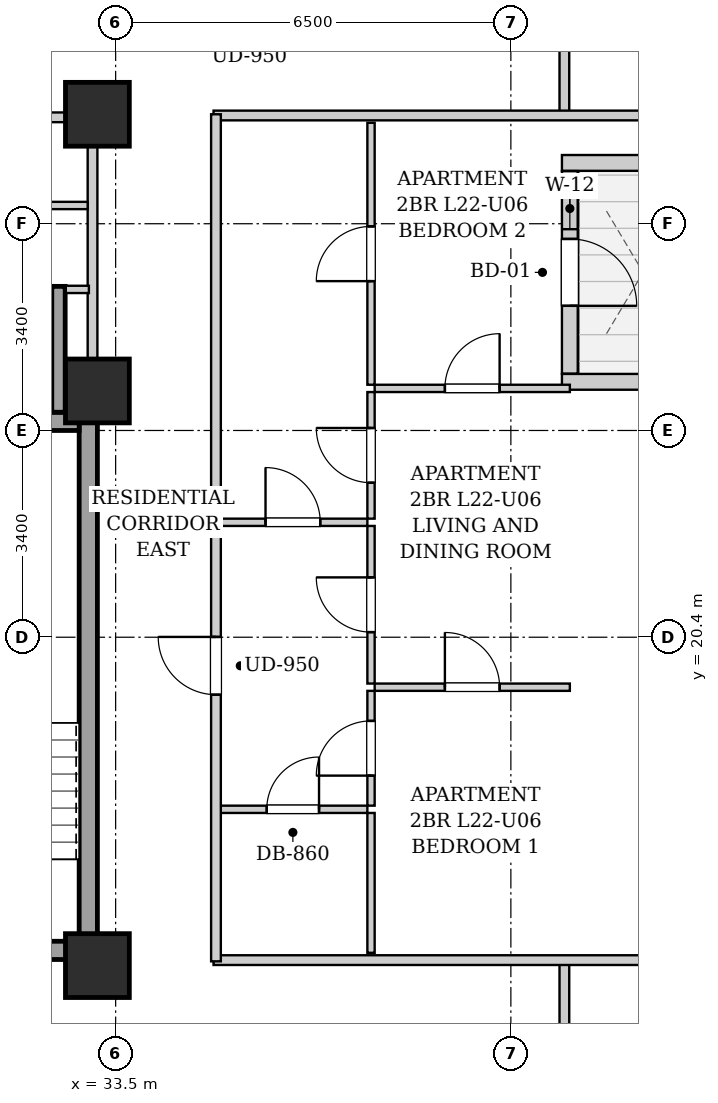
"""IFC4 building model, lengths in metres.
Left out: names, types, materials, properties, quantities, classifications, styles, units other than length and angle.
Written with IfcOpenShell. Run it as: python <this file> out.ifc"""

import sys

from ifc_helpers import new_model, si_unit, direction, frame, frame_2d, origin, origin_2d, place, context, subcontext, project, spatial, rectangle, extrude, element, fill, save


model = new_model("IFC4")
c1 = context("Model", 3, precision=1e-05, world=origin(), true_north=direction((0.0, 1.0)))
c2 = subcontext(c1, "Body", "Model", "MODEL_VIEW")
j1 = project(units=[si_unit("LENGTHUNIT", "METRE"), si_unit("PLANEANGLEUNIT", "RADIAN")], contexts=[c1])
p1 = place(None, origin())
s1 = spatial("IfcSite", under=j1, at=p1, CompositionType="ELEMENT")
p2 = place(p1, origin())
s2 = spatial("IfcBuilding", under=s1, at=p2, CompositionType="ELEMENT")
p3 = place(p2, frame((0.0, 0.0, 81.5)))
s3 = spatial("IfcBuildingStorey", under=s2, at=p3, CompositionType="ELEMENT", Elevation=81.5)
for number, where, z_axis, x_axis in (
    (1, (33.2, 15.0, 0.0), (0.0, 0.0, 1.0), (1.0, 0.0, 0.0)),
    (2, (33.2, 29.0, 0.0), (0.0, 0.0, 1.0), (1.0, 0.0, 0.0)),
    (3, (33.2, 24.45, 0.0), (0.0, 0.0, 1.0), (1.0, 0.0, 0.0)),
):
    element("IfcColumn", number, at=place(p3, frame(where, z_axis=z_axis, x_axis=x_axis)), inside=s3, PredefinedType="COLUMN", context=c2, shape_type="SweptSolid", body=[
        extrude(rectangle(XDim=1.05, YDim=1.05, at=origin_2d()), origin(), (0.0, 0.0, 1.0), 3.2),
    ])
p4 = place(p3, frame((43.24, 28.2, 0.0), z_axis=(0.0, 0.0, 1.0), x_axis=(-1.0, 0.0, 0.0)))
e4 = element("IfcWall", 4, at=p4, inside=s3, PredefinedType="SOLIDWALL", context=c2, shape_type="SweptSolid", body=[
    extrude(rectangle(XDim=2.4, YDim=0.26, at=frame_2d((1.2, 0.0))), origin(), (0.0, 0.0, 1.0), 2.94),
])
p5 = place(p3, frame((40.97, 28.066, 0.0), z_axis=(0.0, 0.0, 1.0), x_axis=(0.0, -1.0, 0.0)))
e5 = element("IfcWall", 5, at=p5, inside=s3, PredefinedType="SOLIDWALL", context=c2, shape_type="SweptSolid", body=[
    extrude(rectangle(XDim=3.332, YDim=0.26, at=frame_2d((1.666, 0.0))), origin(), (0.0, 0.0, 1.0), 2.94),
])
p6 = place(p5, frame((1.116, 0.0, 0.0)))
e6 = element("IfcOpeningElement", 6, at=p6, cuts=e5, PredefinedType="OPENING", context=c2, shape_type="SweptSolid", body=[
    extrude(rectangle(XDim=1.1, YDim=2.0, at=frame_2d((0.55, 1.0))), frame((0.0, 0.14, 0.0), z_axis=(0.0, -1.0, 0.0), x_axis=(1.0, 0.0, 0.0)), (0.0, 0.0, 1.0), 0.28),
])
p7 = place(p5, frame((0.276, 0.0, 0.55)))
e7 = element("IfcOpeningElement", 7, at=p7, cuts=e5, PredefinedType="OPENING", context=c2, shape_type="SweptSolid", body=[
    extrude(rectangle(XDim=0.68, YDim=1.2, at=frame_2d((0.34, 0.6))), frame((0.0, 0.14, 0.0), z_axis=(0.0, -1.0, 0.0), x_axis=(1.0, 0.0, 0.0)), (0.0, 0.0, 1.0), 0.28),
])
p8 = place(p3, frame((40.84, 24.6, 0.0), z_axis=(0.0, 0.0, 1.0), x_axis=(1.0, 0.0, 0.0)))
e8 = element("IfcWall", 8, at=p8, inside=s3, PredefinedType="SOLIDWALL", context=c2, shape_type="SweptSolid", body=[
    extrude(rectangle(XDim=2.4, YDim=0.26, at=frame_2d((1.2, 0.0))), origin(), (0.0, 0.0, 1.0), 2.94),
])
p9 = place(p3, frame((33.05, 15.1, 0.0), z_axis=(0.0, 0.0, 1.0), x_axis=(0.0, 1.0, 0.0)))
e9 = element("IfcWall", 9, at=p9, inside=s3, PredefinedType="SHEAR", context=c2, shape_type="SweptSolid", body=[
    extrude(rectangle(XDim=9.0, YDim=0.3, at=frame_2d((4.5, 0.0))), origin(), (0.0, 0.0, 1.0), 2.94),
])
p10 = place(p3, frame((30.05, 23.95, 0.0), z_axis=(0.0, 0.0, 1.0), x_axis=(1.0, 0.0, 0.0)))
e10 = element("IfcWall", 10, at=p10, inside=s3, PredefinedType="SHEAR", context=c2, shape_type="SweptSolid", body=[
    extrude(rectangle(XDim=2.85, YDim=0.3, at=frame_2d((1.425, 0.0))), origin(), (0.0, 0.0, 1.0), 2.94),
])
p11 = place(p3, frame((30.05, 15.25, 0.0), z_axis=(0.0, 0.0, 1.0), x_axis=(1.0, 0.0, 0.0)))
e11 = element("IfcWall", 11, at=p11, inside=s3, PredefinedType="SHEAR", context=c2, shape_type="SweptSolid", body=[
    extrude(rectangle(XDim=2.85, YDim=0.3, at=frame_2d((1.425, 0.0))), origin(), (0.0, 0.0, 1.0), 2.94),
])
p12 = place(p11, frame((0.86, 0.0, 0.0)))
e12 = element("IfcOpeningElement", 12, at=p12, cuts=e11, PredefinedType="OPENING", context=c2, shape_type="SweptSolid", body=[
    extrude(rectangle(XDim=1.1, YDim=2.05, at=frame_2d((0.55, 1.025))), frame((0.0, 0.16, 0.0), z_axis=(0.0, -1.0, 0.0), x_axis=(1.0, 0.0, 0.0)), (0.0, 0.0, 1.0), 0.32),
])
p13 = place(p3, frame((32.56, 24.1, 0.0), z_axis=(0.0, 0.0, 1.0), x_axis=(0.0, 1.0, 0.0)))
e13 = element("IfcWall", 13, at=p13, inside=s3, PredefinedType="SHEAR", context=c2, shape_type="SweptSolid", body=[
    extrude(rectangle(XDim=2.07, YDim=0.22, at=frame_2d((1.035, 0.0))), origin(), (0.0, 0.0, 1.0), 2.94),
])
p14 = place(p3, frame((33.12, 24.12, 0.0), z_axis=(0.0, 0.0, 1.0), x_axis=(0.0, 1.0, 0.0)))
e14 = element("IfcWall", 14, at=p14, inside=s3, PredefinedType="PARTITIONING", context=c2, shape_type="SweptSolid", body=[
    extrude(rectangle(XDim=4.76, YDim=0.16, at=frame_2d((2.38, 0.0))), origin(), (0.0, 0.0, 1.0), 2.94),
])
p15 = place(p3, frame((32.68, 26.12, 0.0), z_axis=(0.0, 0.0, 1.0), x_axis=(1.0, 0.0, 0.0)))
e15 = element("IfcWall", 15, at=p15, inside=s3, PredefinedType="PARTITIONING", context=c2, shape_type="SweptSolid", body=[
    extrude(rectangle(XDim=0.38, YDim=0.12, at=frame_2d((0.19, 0.0))), origin(), (0.0, 0.0, 1.0), 2.94),
])
p16 = place(p3, frame((30.16, 27.5, 0.0), z_axis=(0.0, 0.0, 1.0), x_axis=(1.0, 0.0, 0.0)))
e16 = element("IfcWall", 16, at=p16, inside=s3, PredefinedType="PARTITIONING", context=c2, shape_type="SweptSolid", body=[
    extrude(rectangle(XDim=2.88, YDim=0.12, at=frame_2d((1.44, 0.0))), origin(), (0.0, 0.0, 1.0), 2.94),
])
p17 = place(p16, frame((0.97, 0.0, 0.0)))
e17 = element("IfcOpeningElement", 17, at=p17, cuts=e16, PredefinedType="OPENING", context=c2, shape_type="SweptSolid", body=[
    extrude(rectangle(XDim=0.86, YDim=2.05, at=frame_2d((0.43, 1.025))), frame((0.0, 0.07, 0.0), z_axis=(0.0, -1.0, 0.0), x_axis=(1.0, 0.0, 0.0)), (0.0, 0.0, 1.0), 0.14),
])
p18 = place(p3, frame((30.08, 28.95, 0.0), z_axis=(0.0, 0.0, 1.0), x_axis=(1.0, 0.0, 0.0)))
e18 = element("IfcWall", 18, at=p18, inside=s3, PredefinedType="PARTITIONING", context=c2, shape_type="SweptSolid", body=[
    extrude(rectangle(XDim=2.96, YDim=0.16, at=frame_2d((1.48, 0.0))), origin(), (0.0, 0.0, 1.0), 2.94),
])
p19 = place(p18, frame((1.045, 0.0, 0.0)))
e19 = element("IfcOpeningElement", 19, at=p19, cuts=e18, PredefinedType="OPENING", context=c2, shape_type="SweptSolid", body=[
    extrude(rectangle(XDim=0.86, YDim=2.05, at=frame_2d((0.43, 1.025))), frame((0.0, 0.09, 0.0), z_axis=(0.0, -1.0, 0.0), x_axis=(1.0, 0.0, 0.0)), (0.0, 0.0, 1.0), 0.18),
])
for number, where, z_axis, x_axis in (
    (20, (40.88, 13.35, 0.0), (0.0, 0.0, 1.0), (0.0, 1.0, 0.0)),
    (21, (40.88, 28.98, 0.0), (0.0, 0.0, 1.0), (0.0, 1.0, 0.0)),
):
    element("IfcWall", number, at=place(p3, frame(where, z_axis=z_axis, x_axis=x_axis)), inside=s3, PredefinedType="PARTITIONING", context=c2, shape_type="SweptSolid", body=[
        extrude(rectangle(XDim=1.74, YDim=0.16, at=frame_2d((0.87, 0.0))), origin(), (0.0, 0.0, 1.0), 2.94),
    ])
for number, where, z_axis, x_axis in (
    (22, (35.11, 15.09, 0.0), (0.0, 0.0, 1.0), (1.0, 0.0, 0.0)),
    (23, (35.11, 28.98, 0.0), (0.0, 0.0, 1.0), (1.0, 0.0, 0.0)),
):
    element("IfcWall", number, at=place(p3, frame(where, z_axis=z_axis, x_axis=x_axis)), inside=s3, PredefinedType="PARTITIONING", context=c2, shape_type="SweptSolid", body=[
        extrude(rectangle(XDim=8.01, YDim=0.16, at=frame_2d((4.005, 0.0))), origin(), (0.0, 0.0, 1.0), 2.309),
    ])
p20 = place(p3, frame((35.19, 22.29, 0.0), z_axis=(0.0, 0.0, 1.0), x_axis=(1.0, 0.0, 0.0)))
e24 = element("IfcWall", 24, at=p20, inside=s3, PredefinedType="PARTITIONING", context=c2, shape_type="SweptSolid", body=[
    extrude(rectangle(XDim=2.45, YDim=0.12, at=frame_2d((1.225, 0.0))), origin(), (0.0, 0.0, 1.0), 2.94),
])
p21 = place(p20, frame((0.775, 0.0, 0.0)))
e25 = element("IfcOpeningElement", 25, at=p21, cuts=e24, PredefinedType="OPENING", context=c2, shape_type="SweptSolid", body=[
    extrude(rectangle(XDim=0.9, YDim=2.05, at=frame_2d((0.45, 1.025))), frame((0.0, 0.07, 0.0), z_axis=(0.0, -1.0, 0.0), x_axis=(1.0, 0.0, 0.0)), (0.0, 0.0, 1.0), 0.14),
])
p22 = place(p3, frame((37.7, 22.35, 0.0), z_axis=(0.0, 0.0, 1.0), x_axis=(0.0, 1.0, 0.0)))
e26 = element("IfcWall", 26, at=p22, inside=s3, PredefinedType="PARTITIONING", context=c2, shape_type="SweptSolid", body=[
    extrude(rectangle(XDim=2.082, YDim=0.12, at=frame_2d((1.041, 0.0))), origin(), (0.0, 0.0, 1.0), 2.94),
])
p23 = place(p22, frame((0.591, 0.0, 0.0)))
e27 = element("IfcOpeningElement", 27, at=p23, cuts=e26, PredefinedType="OPENING", context=c2, shape_type="SweptSolid", body=[
    extrude(rectangle(XDim=0.9, YDim=2.05, at=frame_2d((0.45, 1.025))), frame((0.0, 0.07, 0.0), z_axis=(0.0, -1.0, 0.0), x_axis=(1.0, 0.0, 0.0)), (0.0, 0.0, 1.0), 0.14),
])
p24 = place(p3, frame((37.7, 24.552, 0.0), z_axis=(0.0, 0.0, 1.0), x_axis=(0.0, 1.0, 0.0)))
e28 = element("IfcWall", 28, at=p24, inside=s3, PredefinedType="PARTITIONING", context=c2, shape_type="SweptSolid", body=[
    extrude(rectangle(XDim=4.308, YDim=0.12, at=frame_2d((2.154, 0.0))), origin(), (0.0, 0.0, 1.0), 2.94),
])
p25 = place(p24, frame((1.704, 0.0, 0.0)))
e29 = element("IfcOpeningElement", 29, at=p25, cuts=e28, PredefinedType="OPENING", context=c2, shape_type="SweptSolid", body=[
    extrude(rectangle(XDim=0.9, YDim=2.05, at=frame_2d((0.45, 1.025))), frame((0.0, 0.07, 0.0), z_axis=(0.0, -1.0, 0.0), x_axis=(1.0, 0.0, 0.0)), (0.0, 0.0, 1.0), 0.14),
])
p26 = place(p3, frame((35.19, 17.57, 0.0), z_axis=(0.0, 0.0, 1.0), x_axis=(1.0, 0.0, 0.0)))
e30 = element("IfcWall", 30, at=p26, inside=s3, PredefinedType="PARTITIONING", context=c2, shape_type="SweptSolid", body=[
    extrude(rectangle(XDim=2.45, YDim=0.12, at=frame_2d((1.225, 0.0))), origin(), (0.0, 0.0, 1.0), 2.94),
])
p27 = place(p26, frame((0.795, 0.0, 0.0)))
e31 = element("IfcOpeningElement", 31, at=p27, cuts=e30, PredefinedType="OPENING", context=c2, shape_type="SweptSolid", body=[
    extrude(rectangle(XDim=0.86, YDim=2.05, at=frame_2d((0.43, 1.025))), frame((0.0, 0.07, 0.0), z_axis=(0.0, -1.0, 0.0), x_axis=(1.0, 0.0, 0.0)), (0.0, 0.0, 1.0), 0.14),
])
p28 = place(p3, frame((37.7, 15.21, 0.0), z_axis=(0.0, 0.0, 1.0), x_axis=(0.0, 1.0, 0.0)))
e32 = element("IfcWall", 32, at=p28, inside=s3, PredefinedType="PARTITIONING", context=c2, shape_type="SweptSolid", body=[
    extrude(rectangle(XDim=2.3, YDim=0.12, at=frame_2d((1.15, 0.0))), origin(), (0.0, 0.0, 1.0), 2.94),
])
p29 = place(p3, frame((37.7, 17.63, 0.0), z_axis=(0.0, 0.0, 1.0), x_axis=(0.0, 1.0, 0.0)))
e33 = element("IfcWall", 33, at=p29, inside=s3, PredefinedType="PARTITIONING", context=c2, shape_type="SweptSolid", body=[
    extrude(rectangle(XDim=1.888, YDim=0.12, at=frame_2d((0.944, 0.0))), origin(), (0.0, 0.0, 1.0), 2.94),
])
p30 = place(p29, frame((0.494, 0.0, 0.0)))
e34 = element("IfcOpeningElement", 34, at=p30, cuts=e33, PredefinedType="OPENING", context=c2, shape_type="SweptSolid", body=[
    extrude(rectangle(XDim=0.9, YDim=2.05, at=frame_2d((0.45, 1.025))), frame((0.0, 0.07, 0.0), z_axis=(0.0, -1.0, 0.0), x_axis=(1.0, 0.0, 0.0)), (0.0, 0.0, 1.0), 0.14),
])
p31 = place(p3, frame((37.7, 19.638, 0.0), z_axis=(0.0, 0.0, 1.0), x_axis=(0.0, 1.0, 0.0)))
e35 = element("IfcWall", 35, at=p31, inside=s3, PredefinedType="PARTITIONING", context=c2, shape_type="SweptSolid", body=[
    extrude(rectangle(XDim=2.592, YDim=0.12, at=frame_2d((1.296, 0.0))), origin(), (0.0, 0.0, 1.0), 2.94),
])
p32 = place(p31, frame((0.846, 0.0, 0.0)))
e36 = element("IfcOpeningElement", 36, at=p32, cuts=e35, PredefinedType="OPENING", context=c2, shape_type="SweptSolid", body=[
    extrude(rectangle(XDim=0.9, YDim=2.05, at=frame_2d((0.45, 1.025))), frame((0.0, 0.07, 0.0), z_axis=(0.0, -1.0, 0.0), x_axis=(1.0, 0.0, 0.0)), (0.0, 0.0, 1.0), 0.14),
])
p33 = place(p3, frame((37.76, 19.578, 0.0), z_axis=(0.0, 0.0, 1.0), x_axis=(1.0, 0.0, 0.0)))
e37 = element("IfcWall", 37, at=p33, inside=s3, PredefinedType="PARTITIONING", context=c2, shape_type="SweptSolid", body=[
    extrude(rectangle(XDim=3.21, YDim=0.12, at=frame_2d((1.605, 0.0))), origin(), (0.0, 0.0, 1.0), 2.94),
])
p34 = place(p33, frame((1.155, 0.0, 0.0)))
e38 = element("IfcOpeningElement", 38, at=p34, cuts=e37, PredefinedType="OPENING", context=c2, shape_type="SweptSolid", body=[
    extrude(rectangle(XDim=0.9, YDim=2.05, at=frame_2d((0.45, 1.025))), frame((0.0, 0.07, 0.0), z_axis=(0.0, -1.0, 0.0), x_axis=(1.0, 0.0, 0.0)), (0.0, 0.0, 1.0), 0.14),
])
p35 = place(p3, frame((37.76, 24.492, 0.0), z_axis=(0.0, 0.0, 1.0), x_axis=(1.0, 0.0, 0.0)))
e39 = element("IfcWall", 39, at=p35, inside=s3, PredefinedType="PARTITIONING", context=c2, shape_type="SweptSolid", body=[
    extrude(rectangle(XDim=3.21, YDim=0.12, at=frame_2d((1.605, 0.0))), origin(), (0.0, 0.0, 1.0), 2.518),
])
p36 = place(p35, frame((1.155, 0.0, 0.0)))
e40 = element("IfcOpeningElement", 40, at=p36, cuts=e39, PredefinedType="OPENING", context=c2, shape_type="SweptSolid", body=[
    extrude(rectangle(XDim=0.9, YDim=2.05, at=frame_2d((0.45, 1.025))), frame((0.0, 0.07, 0.0), z_axis=(0.0, -1.0, 0.0), x_axis=(1.0, 0.0, 0.0)), (0.0, 0.0, 1.0), 0.14),
])
p37 = place(p3, frame((35.15, 15.07, 0.0), z_axis=(0.0, 0.0, 1.0), x_axis=(0.0, 1.0, 0.0)))
e41 = element("IfcWall", 41, at=p37, inside=s3, PredefinedType="PARTITIONING", context=c2, shape_type="SweptSolid", body=[
    extrude(rectangle(XDim=13.93, YDim=0.16, at=frame_2d((6.965, 0.0))), origin(), (0.0, 0.0, 1.0), 2.94),
])
p38 = place(p37, frame((4.385, 0.0, 0.0)))
e42 = element("IfcOpeningElement", 42, at=p38, cuts=e41, PredefinedType="OPENING", context=c2, shape_type="SweptSolid", body=[
    extrude(rectangle(XDim=0.95, YDim=2.1, at=frame_2d((0.475, 1.05))), frame((0.0, 0.09, 0.0), z_axis=(0.0, -1.0, 0.0), x_axis=(1.0, 0.0, 0.0)), (0.0, 0.0, 1.0), 0.18),
])
p39 = place(p21, origin())
e43 = element("IfcDoor", 43, at=p39, inside=s3, OperationType="SINGLE_SWING_LEFT", PredefinedType="DOOR", context=c2, shape_type="SweptSolid", body=[
    extrude(rectangle(XDim=0.9, YDim=2.05, at=frame_2d((0.45, 1.025))), frame((0.0, 0.025, 0.0), z_axis=(0.0, -1.0, 0.0), x_axis=(1.0, 0.0, 0.0)), (0.0, 0.0, 1.0), 0.05),
])
fill(e25, e43)
p40 = place(p23, origin())
e44 = element("IfcDoor", 44, at=p40, inside=s3, OperationType="SINGLE_SWING_RIGHT", PredefinedType="DOOR", context=c2, shape_type="SweptSolid", body=[
    extrude(rectangle(XDim=0.9, YDim=2.05, at=frame_2d((0.45, 1.025))), frame((0.0, 0.025, 0.0), z_axis=(0.0, -1.0, 0.0), x_axis=(1.0, 0.0, 0.0)), (0.0, 0.0, 1.0), 0.05),
])
fill(e27, e44)
p41 = place(p25, origin())
e45 = element("IfcDoor", 45, at=p41, inside=s3, OperationType="SINGLE_SWING_LEFT", PredefinedType="DOOR", context=c2, shape_type="SweptSolid", body=[
    extrude(rectangle(XDim=0.9, YDim=2.05, at=frame_2d((0.45, 1.025))), frame((0.0, 0.025, 0.0), z_axis=(0.0, -1.0, 0.0), x_axis=(1.0, 0.0, 0.0)), (0.0, 0.0, 1.0), 0.05),
])
fill(e29, e45)
p42 = place(p27, origin())
e46 = element("IfcDoor", 46, at=p42, inside=s3, OperationType="SINGLE_SWING_RIGHT", PredefinedType="DOOR", context=c2, shape_type="SweptSolid", body=[
    extrude(rectangle(XDim=0.86, YDim=2.05, at=frame_2d((0.43, 1.025))), frame((0.0, 0.025, 0.0), z_axis=(0.0, -1.0, 0.0), x_axis=(1.0, 0.0, 0.0)), (0.0, 0.0, 1.0), 0.05),
])
fill(e31, e46)
p43 = place(p30, origin())
e47 = element("IfcDoor", 47, at=p43, inside=s3, OperationType="SINGLE_SWING_LEFT", PredefinedType="DOOR", context=c2, shape_type="SweptSolid", body=[
    extrude(rectangle(XDim=0.9, YDim=2.05, at=frame_2d((0.45, 1.025))), frame((0.0, 0.025, 0.0), z_axis=(0.0, -1.0, 0.0), x_axis=(1.0, 0.0, 0.0)), (0.0, 0.0, 1.0), 0.05),
])
fill(e34, e47)
p44 = place(p32, origin())
e48 = element("IfcDoor", 48, at=p44, inside=s3, OperationType="SINGLE_SWING_RIGHT", PredefinedType="DOOR", context=c2, shape_type="SweptSolid", body=[
    extrude(rectangle(XDim=0.9, YDim=2.05, at=frame_2d((0.45, 1.025))), frame((0.0, 0.025, 0.0), z_axis=(0.0, -1.0, 0.0), x_axis=(1.0, 0.0, 0.0)), (0.0, 0.0, 1.0), 0.05),
])
fill(e36, e48)
p45 = place(p34, origin())
e49 = element("IfcDoor", 49, at=p45, inside=s3, OperationType="SINGLE_SWING_LEFT", PredefinedType="DOOR", context=c2, shape_type="SweptSolid", body=[
    extrude(rectangle(XDim=0.9, YDim=2.05, at=frame_2d((0.45, 1.025))), frame((0.0, 0.025, 0.0), z_axis=(0.0, -1.0, 0.0), x_axis=(1.0, 0.0, 0.0)), (0.0, 0.0, 1.0), 0.05),
])
fill(e38, e49)
p46 = place(p36, origin())
e50 = element("IfcDoor", 50, at=p46, inside=s3, OperationType="SINGLE_SWING_RIGHT", PredefinedType="DOOR", context=c2, shape_type="SweptSolid", body=[
    extrude(rectangle(XDim=0.9, YDim=2.05, at=frame_2d((0.45, 1.025))), frame((0.0, 0.025, 0.0), z_axis=(0.0, -1.0, 0.0), x_axis=(1.0, 0.0, 0.0)), (0.0, 0.0, 1.0), 0.05),
])
fill(e40, e50)
p47 = place(p38, origin())
e51 = element("IfcDoor", 51, at=p47, inside=s3, OperationType="SINGLE_SWING_RIGHT", PredefinedType="DOOR", context=c2, shape_type="SweptSolid", body=[
    extrude(rectangle(XDim=0.95, YDim=2.1, at=frame_2d((0.475, 1.05))), frame((0.0, 0.025, 0.0), z_axis=(0.0, -1.0, 0.0), x_axis=(1.0, 0.0, 0.0)), (0.0, 0.0, 1.0), 0.05),
])
fill(e42, e51)
p48 = place(p6, origin())
e52 = element("IfcDoor", 52, at=p48, inside=s3, OperationType="SINGLE_SWING_RIGHT", PredefinedType="DOOR", context=c2, shape_type="SweptSolid", body=[
    extrude(rectangle(XDim=1.1, YDim=2.0, at=frame_2d((0.55, 1.0))), frame((0.0, 0.025, 0.0), z_axis=(0.0, -1.0, 0.0), x_axis=(1.0, 0.0, 0.0)), (0.0, 0.0, 1.0), 0.05),
])
fill(e6, e52)
p49 = place(p7, origin())
e53 = element("IfcWindow", 53, at=p49, inside=s3, PartitioningType="SINGLE_PANEL", PredefinedType="WINDOW", context=c2, shape_type="SweptSolid", body=[
    extrude(rectangle(XDim=0.68, YDim=1.2, at=frame_2d((0.34, 0.6))), frame((0.0, 0.03, 0.0), z_axis=(0.0, -1.0, 0.0), x_axis=(1.0, 0.0, 0.0)), (0.0, 0.0, 1.0), 0.06),
])
fill(e7, e53)
save(model, sys.argv[1])
